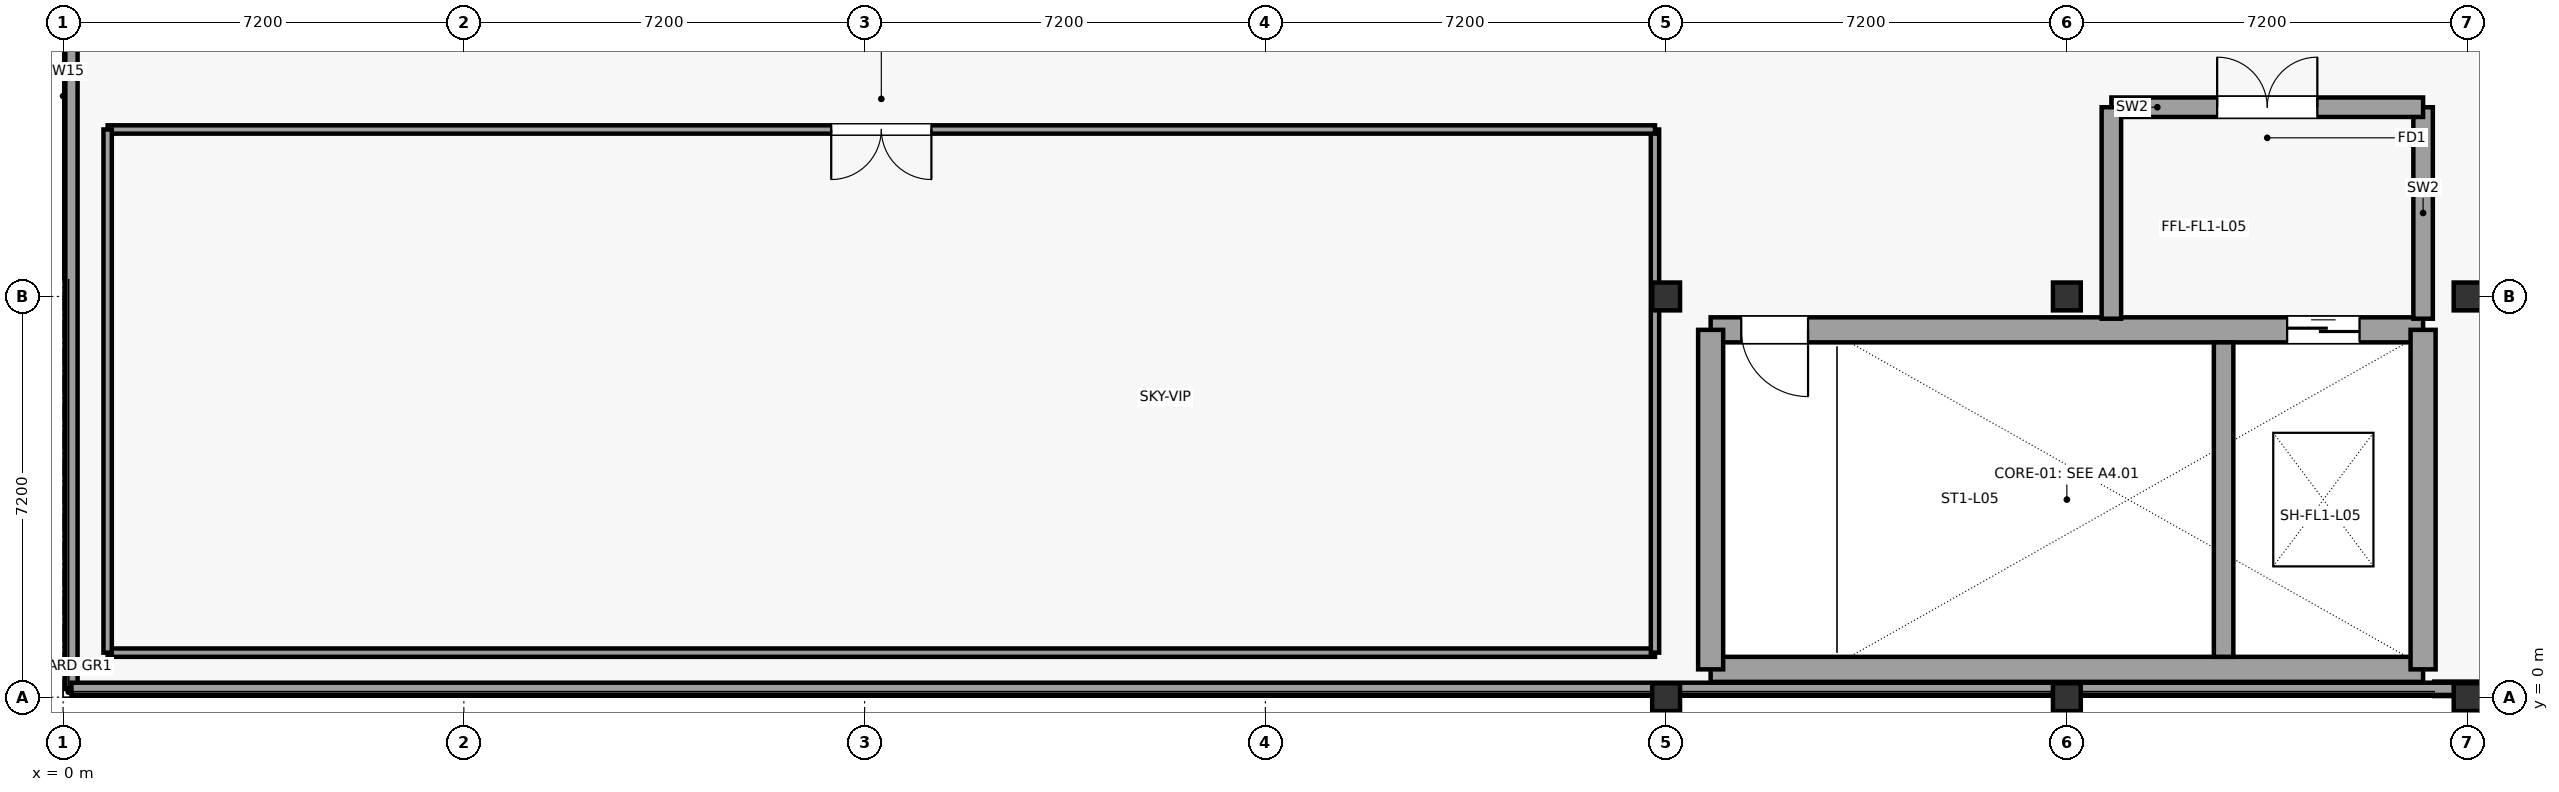
"""IFC4 building model, lengths in metres.
Left out: names, types, materials, properties, quantities, classifications, styles, units other than length and angle.
Written with IfcOpenShell. Run it as: python <this file> out.ifc"""

import sys

from ifc_helpers import new_model, si_unit, direction, frame, frame_2d, origin, origin_2d, place, context, subcontext, project, spatial, rectangle, extrude, element, fill, save


model = new_model("IFC4")
c1 = context("Model", 3, precision=1e-05, world=origin(), true_north=direction((0.0, 1.0)))
c2 = subcontext(c1, "Body", "Model", "MODEL_VIEW")
j1 = project(units=[si_unit("LENGTHUNIT", "METRE"), si_unit("PLANEANGLEUNIT", "RADIAN")], contexts=[c1])
p1 = place(None, origin())
s1 = spatial("IfcSite", under=j1, at=p1, CompositionType="ELEMENT")
p2 = place(p1, origin())
s2 = spatial("IfcBuilding", under=s1, at=p2, CompositionType="ELEMENT")
p3 = place(p2, frame((0.0, 0.0, 23.0)))
s3 = spatial("IfcBuildingStorey", under=s2, at=p3, CompositionType="ELEMENT", Elevation=23.0)
for number, where, z_axis, x_axis in (
    (1, (28.8, 0.0, 0.0), (0.0, 0.0, 1.0), (1.0, 0.0, 0.0)),
    (2, (28.8, 7.2, 0.0), (0.0, 0.0, 1.0), (1.0, 0.0, 0.0)),
    (3, (36.0, 0.0, 0.0), (0.0, 0.0, 1.0), (1.0, 0.0, 0.0)),
    (4, (36.0, 7.2, 0.0), (0.0, 0.0, 1.0), (1.0, 0.0, 0.0)),
    (5, (43.2, 0.0, 0.0), (0.0, 0.0, 1.0), (1.0, 0.0, 0.0)),
    (6, (43.2, 7.2, 0.0), (0.0, 0.0, 1.0), (1.0, 0.0, 0.0)),
):
    element("IfcColumn", number, at=place(p3, frame(where, z_axis=z_axis, x_axis=x_axis)), inside=s3, PredefinedType="COLUMN", context=c2, shape_type="SweptSolid", body=[
        extrude(rectangle(XDim=0.5, YDim=0.5, at=origin_2d()), origin(), (0.0, 0.0, 1.0), 4.5),
    ])
p4 = place(p3, frame((29.6, 0.5, 0.0), z_axis=(0.0, 0.0, 1.0), x_axis=(1.0, 0.0, 0.0)))
e7 = element("IfcWall", 7, at=p4, inside=s3, PredefinedType="SHEAR", context=c2, shape_type="SweptSolid", body=[
    extrude(rectangle(XDim=12.8, YDim=0.45, at=frame_2d((6.4, 0.0))), origin(), (0.0, 0.0, 1.0), 4.28),
])
p5 = place(p3, frame((29.6, 6.6, 0.0), z_axis=(0.0, 0.0, 1.0), x_axis=(1.0, 0.0, 0.0)))
e8 = element("IfcWall", 8, at=p5, inside=s3, PredefinedType="SHEAR", context=c2, shape_type="SweptSolid", body=[
    extrude(rectangle(XDim=12.8, YDim=0.45, at=frame_2d((6.4, 0.0))), origin(), (0.0, 0.0, 1.0), 4.28),
])
p6 = place(p5, frame((0.55, 0.0, 0.0)))
e9 = element("IfcOpeningElement", 9, at=p6, cuts=e8, PredefinedType="OPENING", context=c2, shape_type="SweptSolid", body=[
    extrude(rectangle(XDim=1.2, YDim=2.25, at=frame_2d((0.6, 1.125))), frame((0.0, 0.235, 0.0), z_axis=(0.0, -1.0, 0.0), x_axis=(1.0, 0.0, 0.0)), (0.0, 0.0, 1.0), 0.47),
])
p7 = place(p5, frame((10.358, 0.0, 0.0)))
e10 = element("IfcOpeningElement", 10, at=p7, cuts=e8, PredefinedType="OPENING", context=c2, shape_type="SweptSolid", body=[
    extrude(rectangle(XDim=1.3, YDim=2.25, at=frame_2d((0.65, 1.125))), frame((0.0, 0.235, 0.0), z_axis=(0.0, -1.0, 0.0), x_axis=(1.0, 0.0, 0.0)), (0.0, 0.0, 1.0), 0.47),
])
for number, where, z_axis, x_axis in (
    (11, (29.6, 0.5, 0.0), (0.0, 0.0, 1.0), (0.0, 1.0, 0.0)),
    (12, (42.4, 0.5, 0.0), (0.0, 0.0, 1.0), (0.0, 1.0, 0.0)),
):
    element("IfcWall", number, at=place(p3, frame(where, z_axis=z_axis, x_axis=x_axis)), inside=s3, PredefinedType="SHEAR", context=c2, shape_type="SweptSolid", body=[
        extrude(rectangle(XDim=6.1, YDim=0.45, at=frame_2d((3.05, 0.0))), origin(), (0.0, 0.0, 1.0), 4.28),
    ])
p8 = place(p3, frame((38.816, 0.725, 0.0), z_axis=(0.0, 0.0, 1.0), x_axis=(0.0, 1.0, 0.0)))
e13 = element("IfcWall", 13, at=p8, inside=s3, PredefinedType="SHEAR", context=c2, shape_type="SweptSolid", body=[
    extrude(rectangle(XDim=5.65, YDim=0.35, at=frame_2d((2.825, 0.0))), origin(), (0.0, 0.0, 1.0), 4.28),
])
p9 = place(p3, frame((42.6, 0.15, 0.0), z_axis=(0.0, 0.0, 1.0), x_axis=(1.0, 0.0, 0.0)))
e14 = element("IfcWall", 14, at=p9, inside=s3, PredefinedType="SOLIDWALL", context=c2, shape_type="SweptSolid", body=[
    extrude(rectangle(XDim=3.2, YDim=0.26, at=frame_2d((1.6, 0.0))), origin(), (0.0, 0.0, 1.0), 3.34),
])
p10 = place(p3, frame((0.15, 0.15, 4.5), z_axis=(0.0, 0.0, 1.0), x_axis=(0.0, 1.0, 0.0)))
e15 = element("IfcWall", 15, at=p10, inside=s3, PredefinedType="PARAPET", context=c2, shape_type="SweptSolid", body=[
    extrude(rectangle(XDim=129.3, YDim=0.22, at=frame_2d((64.65, 0.0))), origin(), (0.0, 0.0, 1.0), 1.15),
])
p11 = place(p3, frame((0.15, 0.15, 4.5), z_axis=(0.0, 0.0, 1.0), x_axis=(1.0, 0.0, 0.0)))
e16 = element("IfcWall", 16, at=p11, inside=s3, PredefinedType="PARAPET", context=c2, shape_type="SweptSolid", body=[
    extrude(rectangle(XDim=93.3, YDim=0.22, at=frame_2d((46.65, 0.0))), origin(), (0.0, 0.0, 1.0), 1.15),
])
p12 = place(p3, frame((42.4, 6.8, 0.0), z_axis=(0.0, 0.0, 1.0), x_axis=(0.0, 1.0, 0.0)))
e17 = element("IfcWall", 17, at=p12, inside=s3, PredefinedType="SHEAR", context=c2, shape_type="SweptSolid", body=[
    extrude(rectangle(XDim=3.8, YDim=0.35, at=frame_2d((1.9, 0.0))), origin(), (0.0, 0.0, 1.0), 3.34),
])
p13 = place(p3, frame((42.4, 10.6, 0.0), z_axis=(0.0, 0.0, 1.0), x_axis=(-1.0, 0.0, 0.0)))
e18 = element("IfcWall", 18, at=p13, inside=s3, PredefinedType="SHEAR", context=c2, shape_type="SweptSolid", body=[
    extrude(rectangle(XDim=5.6, YDim=0.35, at=frame_2d((2.8, 0.0))), origin(), (0.0, 0.0, 1.0), 3.34),
])
p14 = place(p13, frame((1.9, 0.0, 0.0)))
e19 = element("IfcOpeningElement", 19, at=p14, cuts=e18, PredefinedType="OPENING", context=c2, shape_type="SweptSolid", body=[
    extrude(rectangle(XDim=1.8, YDim=2.3, at=frame_2d((0.9, 1.15))), frame((0.0, 0.185, 0.0), z_axis=(0.0, -1.0, 0.0), x_axis=(1.0, 0.0, 0.0)), (0.0, 0.0, 1.0), 0.37),
])
p15 = place(p3, frame((36.8, 10.6, 0.0), z_axis=(0.0, 0.0, 1.0), x_axis=(0.0, -1.0, 0.0)))
e20 = element("IfcWall", 20, at=p15, inside=s3, PredefinedType="SHEAR", context=c2, shape_type="SweptSolid", body=[
    extrude(rectangle(XDim=3.8, YDim=0.35, at=frame_2d((1.9, 0.0))), origin(), (0.0, 0.0, 1.0), 3.34),
])
p16 = place(p3, frame((0.8, 0.8, 0.0), z_axis=(0.0, 0.0, 1.0), x_axis=(1.0, 0.0, 0.0)))
e21 = element("IfcWall", 21, at=p16, inside=s3, PredefinedType="PARTITIONING", context=c2, shape_type="SweptSolid", body=[
    extrude(rectangle(XDim=27.8, YDim=0.15, at=frame_2d((13.9, 0.0))), origin(), (0.0, 0.0, 1.0), 3.34),
])
p17 = place(p3, frame((28.6, 0.8, 0.0), z_axis=(0.0, 0.0, 1.0), x_axis=(0.0, 1.0, 0.0)))
e22 = element("IfcWall", 22, at=p17, inside=s3, PredefinedType="PARTITIONING", context=c2, shape_type="SweptSolid", body=[
    extrude(rectangle(XDim=9.4, YDim=0.15, at=frame_2d((4.7, 0.0))), origin(), (0.0, 0.0, 1.0), 3.34),
])
p18 = place(p3, frame((28.6, 10.2, 0.0), z_axis=(0.0, 0.0, 1.0), x_axis=(-1.0, 0.0, 0.0)))
e23 = element("IfcWall", 23, at=p18, inside=s3, PredefinedType="PARTITIONING", context=c2, shape_type="SweptSolid", body=[
    extrude(rectangle(XDim=27.8, YDim=0.15, at=frame_2d((13.9, 0.0))), origin(), (0.0, 0.0, 1.0), 3.34),
])
p19 = place(p18, frame((13.0, 0.0, 0.0)))
e24 = element("IfcOpeningElement", 24, at=p19, cuts=e23, PredefinedType="OPENING", context=c2, shape_type="SweptSolid", body=[
    extrude(rectangle(XDim=1.8, YDim=2.3, at=frame_2d((0.9, 1.15))), frame((0.0, 0.085, 0.0), z_axis=(0.0, -1.0, 0.0), x_axis=(1.0, 0.0, 0.0)), (0.0, 0.0, 1.0), 0.17),
])
p20 = place(p3, frame((0.8, 10.2, 0.0), z_axis=(0.0, 0.0, 1.0), x_axis=(0.0, -1.0, 0.0)))
e25 = element("IfcWall", 25, at=p20, inside=s3, PredefinedType="PARTITIONING", context=c2, shape_type="SweptSolid", body=[
    extrude(rectangle(XDim=9.4, YDim=0.15, at=frame_2d((4.7, 0.0))), origin(), (0.0, 0.0, 1.0), 3.34),
])
p21 = place(p6, frame((1.2, 0.0, 0.0), z_axis=(0.0, 0.0, 1.0), x_axis=(-1.0, 0.0, 0.0)))
e26 = element("IfcDoor", 26, at=p21, inside=s3, OperationType="SINGLE_SWING_RIGHT", PredefinedType="DOOR", context=c2, shape_type="SweptSolid", body=[
    extrude(rectangle(XDim=1.2, YDim=2.25, at=frame_2d((0.6, 1.125))), frame((0.0, 0.025, 0.0), z_axis=(0.0, -1.0, 0.0), x_axis=(1.0, 0.0, 0.0)), (0.0, 0.0, 1.0), 0.05),
])
fill(e9, e26)
p22 = place(p7, origin())
e27 = element("IfcDoor", 27, at=p22, inside=s3, OperationType="SLIDING_TO_LEFT", PredefinedType="DOOR", context=c2, shape_type="SweptSolid", body=[
    extrude(rectangle(XDim=1.3, YDim=2.25, at=frame_2d((0.65, 1.125))), frame((0.0, 0.025, 0.0), z_axis=(0.0, -1.0, 0.0), x_axis=(1.0, 0.0, 0.0)), (0.0, 0.0, 1.0), 0.05),
])
fill(e10, e27)
p23 = place(p14, frame((1.8, 0.0, 0.0), z_axis=(0.0, 0.0, 1.0), x_axis=(-1.0, 0.0, 0.0)))
e28 = element("IfcDoor", 28, at=p23, inside=s3, OperationType="DOUBLE_DOOR_SINGLE_SWING", PredefinedType="DOOR", context=c2, shape_type="SweptSolid", body=[
    extrude(rectangle(XDim=1.8, YDim=2.3, at=frame_2d((0.9, 1.15))), frame((0.0, 0.025, 0.0), z_axis=(0.0, -1.0, 0.0), x_axis=(1.0, 0.0, 0.0)), (0.0, 0.0, 1.0), 0.05),
])
fill(e19, e28)
p24 = place(p19, origin())
e29 = element("IfcDoor", 29, at=p24, inside=s3, OperationType="DOUBLE_DOOR_SINGLE_SWING", PredefinedType="DOOR", context=c2, shape_type="SweptSolid", body=[
    extrude(rectangle(XDim=1.8, YDim=2.3, at=frame_2d((0.9, 1.15))), frame((0.0, 0.025, 0.0), z_axis=(0.0, -1.0, 0.0), x_axis=(1.0, 0.0, 0.0)), (0.0, 0.0, 1.0), 0.05),
])
fill(e24, e29)
save(model, sys.argv[1])
